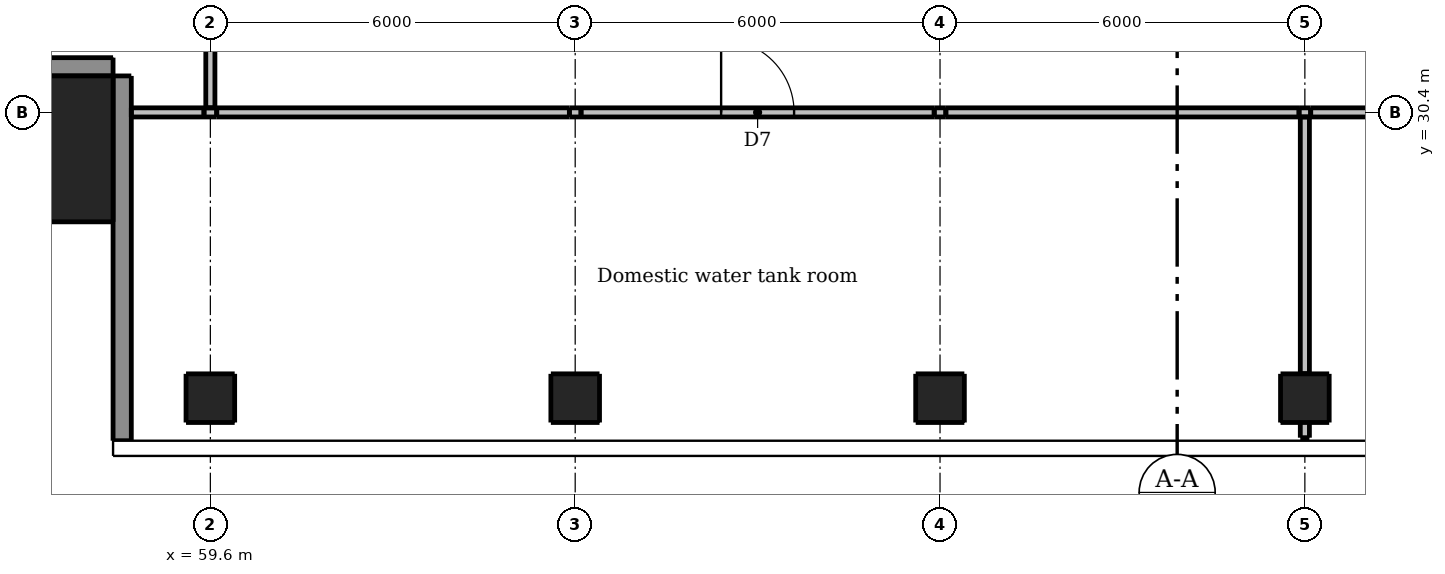
"""IFC4 building model, lengths in metres.
Left out: names, types, materials, properties, quantities, classifications, styles, units other than length and angle.
Written with IfcOpenShell. Run it as: python <this file> out.ifc"""

import sys

from ifc_helpers import new_model, si_unit, direction, frame, frame_2d, origin, origin_2d, place, context, subcontext, project, spatial, rectangle, extrude, element, fill, save


model = new_model("IFC4")
c1 = context("Model", 3, precision=1e-05, world=origin(), true_north=direction((0.0, 1.0)))
c2 = subcontext(c1, "Body", "Model", "MODEL_VIEW")
j1 = project(units=[si_unit("LENGTHUNIT", "METRE"), si_unit("PLANEANGLEUNIT", "RADIAN")], contexts=[c1])
p1 = place(None, origin())
s1 = spatial("IfcSite", under=j1, at=p1, CompositionType="ELEMENT")
p2 = place(p1, origin())
s2 = spatial("IfcBuilding", under=s1, at=p2, CompositionType="ELEMENT")
p3 = place(p2, frame((0.0, 0.0, 281.8)))
s3 = spatial("IfcBuildingStorey", under=s2, at=p3, CompositionType="ELEMENT", Elevation=281.8)
for number, where, z_axis, x_axis in (
    (1, (59.6, 25.7, 0.0), (0.0, 0.0, 1.0), (1.0, 0.0, 0.0)),
    (2, (65.6, 25.7, 0.0), (0.0, 0.0, 1.0), (1.0, 0.0, 0.0)),
    (3, (71.6, 25.7, 0.0), (0.0, 0.0, 1.0), (1.0, 0.0, 0.0)),
    (4, (77.6, 25.7, 0.0), (0.0, 0.0, 1.0), (1.0, 0.0, 0.0)),
):
    element("IfcColumn", number, at=place(p3, frame(where, z_axis=z_axis, x_axis=x_axis)), inside=s3, PredefinedType="COLUMN", context=c2, shape_type="SweptSolid", body=[
        extrude(rectangle(XDim=0.8, YDim=0.8, at=origin_2d()), origin(), (0.0, 0.0, 1.0), 4.2),
    ])
p4 = place(p3, frame((56.8, 29.8, 0.0), z_axis=(0.0, 0.0, 1.0), x_axis=(1.0, 0.0, 0.0)))
e5 = element("IfcColumn", 5, at=p4, inside=s3, PredefinedType="COLUMN", context=c2, shape_type="SweptSolid", body=[
    extrude(rectangle(XDim=2.4, YDim=2.4, at=origin_2d()), origin(), (0.0, 0.0, 1.0), 4.5),
])
p5 = place(p3, frame((53.0, 31.15, 0.0), z_axis=(0.0, 0.0, 1.0), x_axis=(1.0, 0.0, 0.0)))
e6 = element("IfcWall", 6, at=p5, inside=s3, PredefinedType="SOLIDWALL", context=c2, shape_type="SweptSolid", body=[
    extrude(rectangle(XDim=5.0, YDim=0.3, at=frame_2d((2.5, 0.0))), origin(), (0.0, 0.0, 1.0), 4.2),
])
p6 = place(p3, frame((58.15, 31.0, 0.0), z_axis=(0.0, 0.0, 1.0), x_axis=(0.0, -1.0, 0.0)))
e7 = element("IfcWall", 7, at=p6, inside=s3, PredefinedType="SOLIDWALL", context=c2, shape_type="SweptSolid", body=[
    extrude(rectangle(XDim=6.0, YDim=0.3, at=frame_2d((3.0, 0.0))), origin(), (0.0, 0.0, 1.0), 4.2),
])
p7 = place(p3, frame((58.3, 30.4, 0.0), z_axis=(0.0, 0.0, 1.0), x_axis=(1.0, 0.0, 0.0)))
e8 = element("IfcWall", 8, at=p7, inside=s3, PredefinedType="PARTITIONING", context=c2, shape_type="SweptSolid", body=[
    extrude(rectangle(XDim=1.195, YDim=0.15, at=frame_2d((0.598, 0.0))), origin(), (0.0, 0.0, 1.0), 4.2),
])
p8 = place(p3, frame((59.495, 30.4, 0.0), z_axis=(0.0, 0.0, 1.0), x_axis=(1.0, 0.0, 0.0)))
e9 = element("IfcWall", 9, at=p8, inside=s3, PredefinedType="PARTITIONING", context=c2, shape_type="SweptSolid", body=[
    extrude(rectangle(XDim=0.209, YDim=0.15, at=frame_2d((0.104, 0.0))), origin(), (0.0, 0.0, 1.0), 3.667),
])
p9 = place(p3, frame((59.705, 30.4, 0.0), z_axis=(0.0, 0.0, 1.0), x_axis=(1.0, 0.0, 0.0)))
e10 = element("IfcWall", 10, at=p9, inside=s3, PredefinedType="PARTITIONING", context=c2, shape_type="SweptSolid", body=[
    extrude(rectangle(XDim=5.8, YDim=0.15, at=frame_2d((2.9, 0.0))), origin(), (0.0, 0.0, 1.0), 4.2),
])
p10 = place(p3, frame((65.504, 30.4, 0.0), z_axis=(0.0, 0.0, 1.0), x_axis=(1.0, 0.0, 0.0)))
e11 = element("IfcWall", 11, at=p10, inside=s3, PredefinedType="PARTITIONING", context=c2, shape_type="SweptSolid", body=[
    extrude(rectangle(XDim=0.191, YDim=0.15, at=frame_2d((0.096, 0.0))), origin(), (0.0, 0.0, 1.0), 3.74),
])
p11 = place(p3, frame((65.696, 30.4, 0.0), z_axis=(0.0, 0.0, 1.0), x_axis=(1.0, 0.0, 0.0)))
e12 = element("IfcWall", 12, at=p11, inside=s3, PredefinedType="PARTITIONING", context=c2, shape_type="SweptSolid", body=[
    extrude(rectangle(XDim=5.809, YDim=0.15, at=frame_2d((2.904, 0.0))), origin(), (0.0, 0.0, 1.0), 4.2),
])
p12 = place(p11, frame((2.304, 0.0, 0.0)))
e13 = element("IfcOpeningElement", 13, at=p12, cuts=e12, PredefinedType="OPENING", context=c2, shape_type="SweptSolid", body=[
    extrude(rectangle(XDim=1.2, YDim=2.1, at=frame_2d((0.6, 1.05))), frame((0.0, 0.085, 0.0), z_axis=(0.0, -1.0, 0.0), x_axis=(1.0, 0.0, 0.0)), (0.0, 0.0, 1.0), 0.17),
])
p13 = place(p3, frame((71.504, 30.4, 0.0), z_axis=(0.0, 0.0, 1.0), x_axis=(1.0, 0.0, 0.0)))
e14 = element("IfcWall", 14, at=p13, inside=s3, PredefinedType="PARTITIONING", context=c2, shape_type="SweptSolid", body=[
    extrude(rectangle(XDim=0.191, YDim=0.15, at=frame_2d((0.096, 0.0))), origin(), (0.0, 0.0, 1.0), 3.74),
])
p14 = place(p3, frame((71.696, 30.4, 0.0), z_axis=(0.0, 0.0, 1.0), x_axis=(1.0, 0.0, 0.0)))
e15 = element("IfcWall", 15, at=p14, inside=s3, PredefinedType="PARTITIONING", context=c2, shape_type="SweptSolid", body=[
    extrude(rectangle(XDim=5.809, YDim=0.15, at=frame_2d((2.904, 0.0))), origin(), (0.0, 0.0, 1.0), 4.2),
])
p15 = place(p3, frame((77.504, 30.4, 0.0), z_axis=(0.0, 0.0, 1.0), x_axis=(1.0, 0.0, 0.0)))
e16 = element("IfcWall", 16, at=p15, inside=s3, PredefinedType="PARTITIONING", context=c2, shape_type="SweptSolid", body=[
    extrude(rectangle(XDim=0.191, YDim=0.15, at=frame_2d((0.096, 0.0))), origin(), (0.0, 0.0, 1.0), 3.74),
])
p16 = place(p3, frame((77.696, 30.4, 0.0), z_axis=(0.0, 0.0, 1.0), x_axis=(1.0, 0.0, 0.0)))
e17 = element("IfcWall", 17, at=p16, inside=s3, PredefinedType="PARTITIONING", context=c2, shape_type="SweptSolid", body=[
    extrude(rectangle(XDim=5.815, YDim=0.15, at=frame_2d((2.908, 0.0))), origin(), (0.0, 0.0, 1.0), 4.2),
])
p17 = place(p16, frame((4.504, 0.0, 0.0)))
e18 = element("IfcOpeningElement", 18, at=p17, cuts=e17, PredefinedType="OPENING", context=c2, shape_type="SweptSolid", body=[
    extrude(rectangle(XDim=1.2, YDim=2.1, at=frame_2d((0.6, 1.05))), frame((0.0, 0.085, 0.0), z_axis=(0.0, -1.0, 0.0), x_axis=(1.0, 0.0, 0.0)), (0.0, 0.0, 1.0), 0.17),
])
p18 = place(p3, frame((59.6, 30.475, 0.0), z_axis=(0.0, 0.0, 1.0), x_axis=(0.0, 1.0, 0.0)))
e19 = element("IfcWall", 19, at=p18, inside=s3, PredefinedType="PARTITIONING", context=c2, shape_type="SweptSolid", body=[
    extrude(rectangle(XDim=5.82, YDim=0.15, at=frame_2d((2.91, 0.0))), origin(), (0.0, 0.0, 1.0), 3.667),
])
p19 = place(p3, frame((77.6, 25.05, 0.0), z_axis=(0.0, 0.0, 1.0), x_axis=(0.0, 1.0, 0.0)))
e20 = element("IfcWall", 20, at=p19, inside=s3, PredefinedType="PARTITIONING", context=c2, shape_type="SweptSolid", body=[
    extrude(rectangle(XDim=1.05, YDim=0.15, at=frame_2d((0.525, 0.0))), origin(), (0.0, 0.0, 1.0), 4.2),
])
p20 = place(p3, frame((77.6, 26.1, 0.0), z_axis=(0.0, 0.0, 1.0), x_axis=(0.0, 1.0, 0.0)))
e21 = element("IfcWall", 21, at=p20, inside=s3, PredefinedType="PARTITIONING", context=c2, shape_type="SweptSolid", body=[
    extrude(rectangle(XDim=4.225, YDim=0.15, at=frame_2d((2.112, 0.0))), origin(), (0.0, 0.0, 1.0), 3.74),
])
p21 = place(p12, origin())
e22 = element("IfcDoor", 22, at=p21, inside=s3, OperationType="SINGLE_SWING_LEFT", PredefinedType="DOOR", context=c2, shape_type="SweptSolid", body=[
    extrude(rectangle(XDim=1.2, YDim=2.1, at=frame_2d((0.6, 1.05))), frame((0.0, 0.025, 0.0), z_axis=(0.0, -1.0, 0.0), x_axis=(1.0, 0.0, 0.0)), (0.0, 0.0, 1.0), 0.05),
])
fill(e13, e22)
save(model, sys.argv[1])
